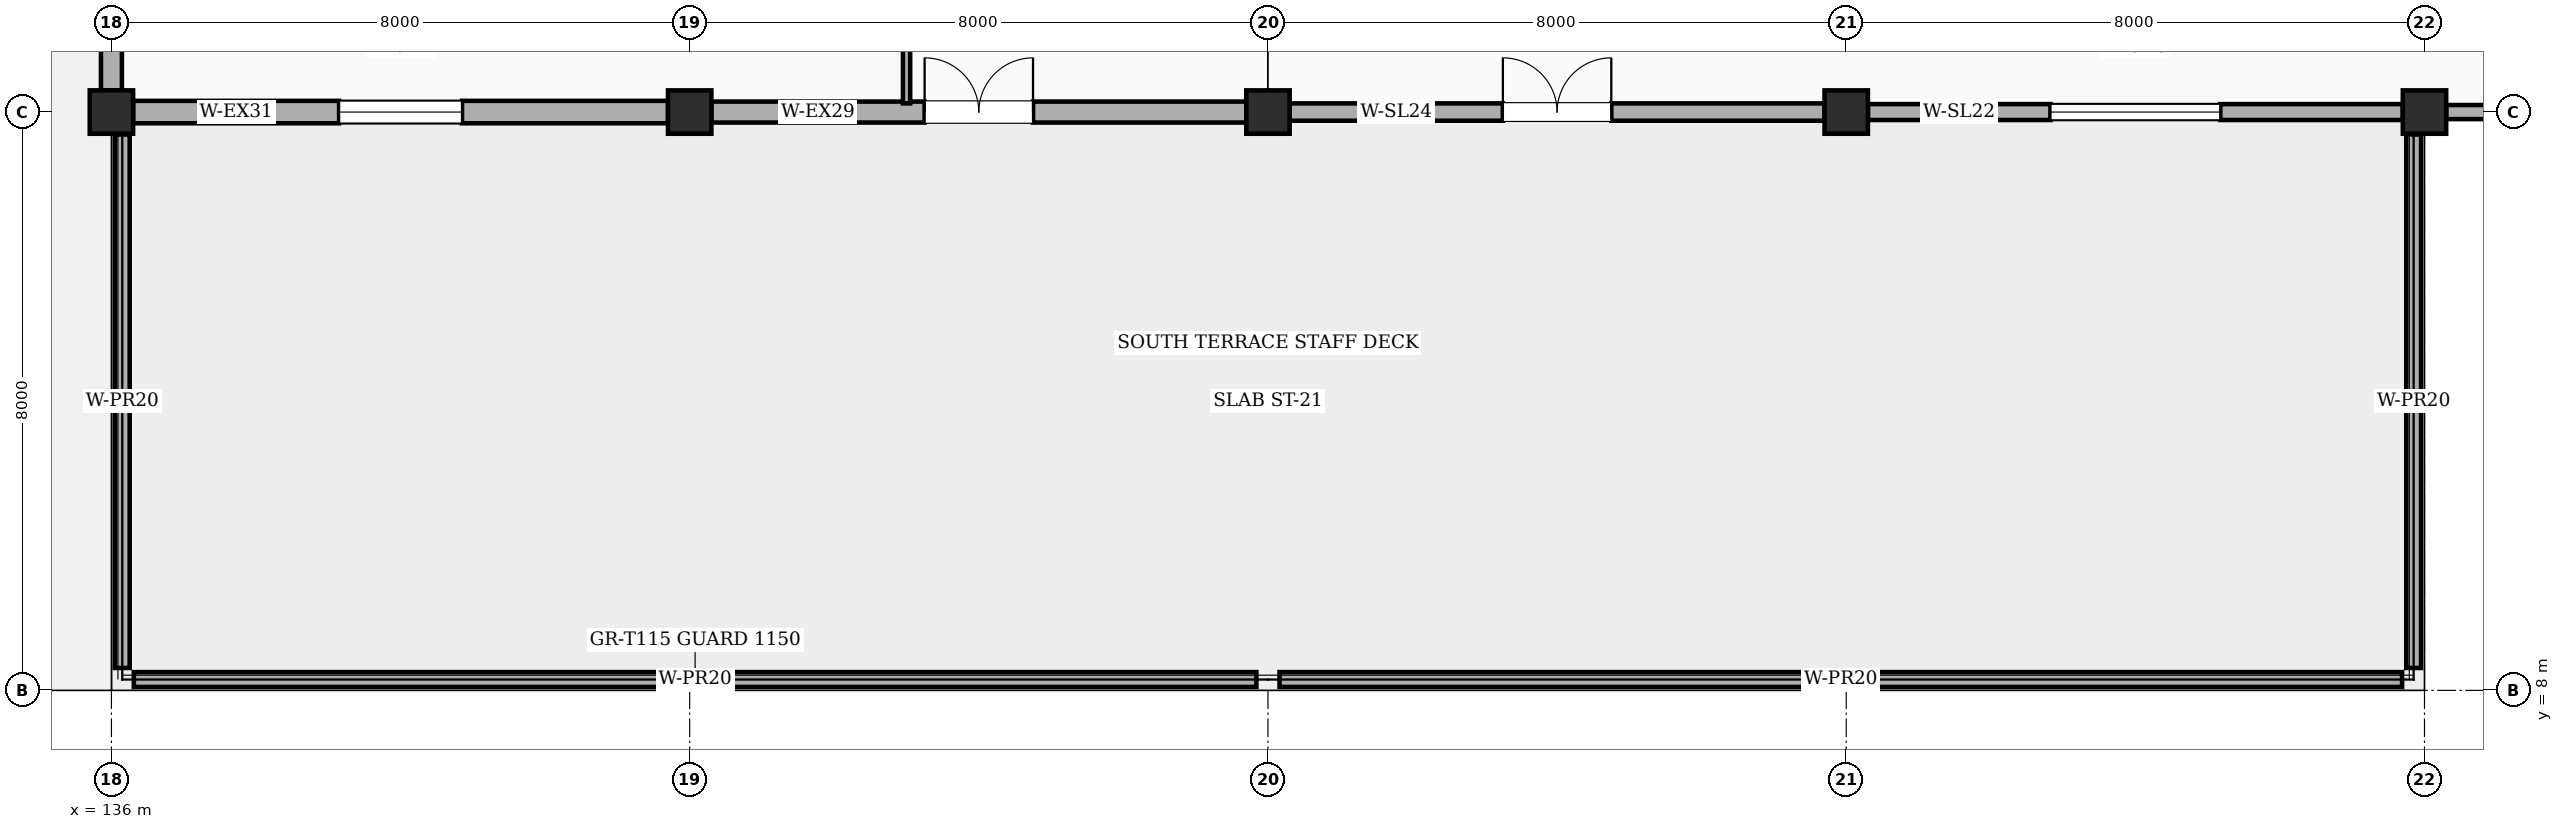
"""IFC4 building model, lengths in metres.
Left out: names, types, materials, properties, quantities, classifications, styles, units other than length and angle.
Written with IfcOpenShell. Run it as: python <this file> out.ifc"""

import sys

from ifc_helpers import new_model, si_unit, direction, frame, frame_2d, origin, origin_2d, place, context, subcontext, project, spatial, rectangle, extrude, element, fill, save


model = new_model("IFC4")
c1 = context("Model", 3, precision=1e-05, world=origin(), true_north=direction((0.0, 1.0)))
c2 = subcontext(c1, "Body", "Model", "MODEL_VIEW")
j1 = project(units=[si_unit("LENGTHUNIT", "METRE"), si_unit("PLANEANGLEUNIT", "RADIAN")], contexts=[c1])
p1 = place(None, origin())
s1 = spatial("IfcSite", under=j1, at=p1, CompositionType="ELEMENT")
p2 = place(p1, origin())
s2 = spatial("IfcBuilding", under=s1, at=p2, CompositionType="ELEMENT")
p3 = place(p2, frame((0.0, 0.0, 19.2)))
s3 = spatial("IfcBuildingStorey", under=s2, at=p3, CompositionType="ELEMENT", Elevation=19.2)
for number, where, z_axis, x_axis in (
    (1, (136.0, 16.0, 0.0), (0.0, 0.0, 1.0), (1.0, 0.0, 0.0)),
    (2, (144.0, 16.0, 0.0), (0.0, 0.0, 1.0), (1.0, 0.0, 0.0)),
    (3, (152.0, 16.0, 0.0), (0.0, 0.0, 1.0), (1.0, 0.0, 0.0)),
    (4, (160.0, 16.0, 0.0), (0.0, 0.0, 1.0), (1.0, 0.0, 0.0)),
    (5, (168.0, 16.0, 0.0), (0.0, 0.0, 1.0), (1.0, 0.0, 0.0)),
):
    element("IfcColumn", number, at=place(p3, frame(where, z_axis=z_axis, x_axis=x_axis)), inside=s3, PredefinedType="COLUMN", context=c2, shape_type="SweptSolid", body=[
        extrude(rectangle(XDim=0.6, YDim=0.6, at=origin_2d()), origin(), (0.0, 0.0, 1.0), 4.2),
    ])
p4 = place(p3, frame((136.3, 16.0, 0.0), z_axis=(0.0, 0.0, 1.0), x_axis=(1.0, 0.0, 0.0)))
e6 = element("IfcWall", 6, at=p4, inside=s3, PredefinedType="STANDARD", context=c2, shape_type="SweptSolid", body=[
    extrude(rectangle(XDim=7.4, YDim=0.31, at=frame_2d((3.7, 0.0))), origin(), (0.0, 0.0, 1.0), 3.442),
])
p5 = place(p4, frame((2.85, 0.0, 0.95)))
e7 = element("IfcOpeningElement", 7, at=p5, cuts=e6, PredefinedType="OPENING", context=c2, shape_type="SweptSolid", body=[
    extrude(rectangle(XDim=1.7, YDim=1.65, at=frame_2d((0.85, 0.825))), frame((0.0, 0.165, 0.0), z_axis=(0.0, -1.0, 0.0), x_axis=(1.0, 0.0, 0.0)), (0.0, 0.0, 1.0), 0.33),
])
p6 = place(p3, frame((144.3, 16.0, 0.0), z_axis=(0.0, 0.0, 1.0), x_axis=(1.0, 0.0, 0.0)))
e8 = element("IfcWall", 8, at=p6, inside=s3, PredefinedType="STANDARD", context=c2, shape_type="SweptSolid", body=[
    extrude(rectangle(XDim=7.4, YDim=0.29, at=frame_2d((3.7, 0.0))), origin(), (0.0, 0.0, 1.0), 3.96),
])
p7 = place(p6, frame((2.95, 0.0, 0.0)))
e9 = element("IfcOpeningElement", 9, at=p7, cuts=e8, PredefinedType="OPENING", context=c2, shape_type="SweptSolid", body=[
    extrude(rectangle(XDim=1.5, YDim=2.25, at=frame_2d((0.75, 1.125))), frame((0.0, 0.155, 0.0), z_axis=(0.0, -1.0, 0.0), x_axis=(1.0, 0.0, 0.0)), (0.0, 0.0, 1.0), 0.31),
])
p8 = place(p3, frame((152.3, 16.0, 0.0), z_axis=(0.0, 0.0, 1.0), x_axis=(1.0, 0.0, 0.0)))
e10 = element("IfcWall", 10, at=p8, inside=s3, PredefinedType="SOLIDWALL", context=c2, shape_type="SweptSolid", body=[
    extrude(rectangle(XDim=7.4, YDim=0.24, at=frame_2d((3.7, 0.0))), origin(), (0.0, 0.0, 1.0), 3.585),
])
p9 = place(p8, frame((2.95, 0.0, 0.0)))
e11 = element("IfcOpeningElement", 11, at=p9, cuts=e10, PredefinedType="OPENING", context=c2, shape_type="SweptSolid", body=[
    extrude(rectangle(XDim=1.5, YDim=2.25, at=frame_2d((0.75, 1.125))), frame((0.0, 0.13, 0.0), z_axis=(0.0, -1.0, 0.0), x_axis=(1.0, 0.0, 0.0)), (0.0, 0.0, 1.0), 0.26),
])
p10 = place(p3, frame((160.3, 16.0, 0.0), z_axis=(0.0, 0.0, 1.0), x_axis=(1.0, 0.0, 0.0)))
e12 = element("IfcWall", 12, at=p10, inside=s3, PredefinedType="SOLIDWALL", context=c2, shape_type="SweptSolid", body=[
    extrude(rectangle(XDim=7.4, YDim=0.22, at=frame_2d((3.7, 0.0))), origin(), (0.0, 0.0, 1.0), 3.585),
])
p11 = place(p10, frame((2.525, 0.0, 0.95)))
e13 = element("IfcOpeningElement", 13, at=p11, cuts=e12, PredefinedType="OPENING", context=c2, shape_type="SweptSolid", body=[
    extrude(rectangle(XDim=2.35, YDim=1.65, at=frame_2d((1.175, 0.825))), frame((0.0, 0.12, 0.0), z_axis=(0.0, -1.0, 0.0), x_axis=(1.0, 0.0, 0.0)), (0.0, 0.0, 1.0), 0.24),
])
p12 = place(p3, frame((168.3, 16.0, 0.0), z_axis=(0.0, 0.0, 1.0), x_axis=(1.0, 0.0, 0.0)))
e14 = element("IfcWall", 14, at=p12, inside=s3, PredefinedType="SOLIDWALL", context=c2, shape_type="SweptSolid", body=[
    extrude(rectangle(XDim=7.4, YDim=0.195, at=frame_2d((3.7, 0.0))), origin(), (0.0, 0.0, 1.0), 3.58),
])
p13 = place(p12, frame((2.85, 0.0, 0.95)))
e15 = element("IfcOpeningElement", 15, at=p13, cuts=e14, PredefinedType="OPENING", context=c2, shape_type="SweptSolid", body=[
    extrude(rectangle(XDim=1.7, YDim=1.65, at=frame_2d((0.85, 0.825))), frame((0.0, 0.107, 0.0), z_axis=(0.0, -1.0, 0.0), x_axis=(1.0, 0.0, 0.0)), (0.0, 0.0, 1.0), 0.215),
])
p14 = place(p3, frame((136.0, 23.7, 0.0), z_axis=(0.0, 0.0, 1.0), x_axis=(0.0, -1.0, 0.0)))
e16 = element("IfcWall", 16, at=p14, inside=s3, PredefinedType="STANDARD", context=c2, shape_type="SweptSolid", body=[
    extrude(rectangle(XDim=7.4, YDim=0.29, at=frame_2d((3.7, 0.0))), origin(), (0.0, 0.0, 1.0), 3.58),
])
p15 = place(p14, frame((2.525, 0.0, 0.95)))
e17 = element("IfcOpeningElement", 17, at=p15, cuts=e16, PredefinedType="OPENING", context=c2, shape_type="SweptSolid", body=[
    extrude(rectangle(XDim=2.35, YDim=1.65, at=frame_2d((1.175, 0.825))), frame((0.0, 0.155, 0.0), z_axis=(0.0, -1.0, 0.0), x_axis=(1.0, 0.0, 0.0)), (0.0, 0.0, 1.0), 0.31),
])
for number, where, z_axis, x_axis in (
    (18, (136.31, 8.15, 0.0), (0.0, 0.0, 1.0), (1.0, 0.0, 0.0)),
    (19, (152.16, 8.15, 0.0), (0.0, 0.0, 1.0), (1.0, 0.0, 0.0)),
):
    element("IfcWall", number, at=place(p3, frame(where, z_axis=z_axis, x_axis=x_axis)), inside=s3, PredefinedType="PARAPET", context=c2, shape_type="SweptSolid", body=[
        extrude(rectangle(XDim=15.53, YDim=0.205, at=frame_2d((7.765, 0.0))), origin(), (0.0, 0.0, 1.0), 0.42),
    ])
for number, where, z_axis, x_axis in (
    (20, (136.15, 8.31, 0.0), (0.0, 0.0, 1.0), (0.0, 1.0, 0.0)),
    (21, (167.85, 8.31, 0.0), (0.0, 0.0, 1.0), (0.0, 1.0, 0.0)),
):
    element("IfcWall", number, at=place(p3, frame(where, z_axis=z_axis, x_axis=x_axis)), inside=s3, PredefinedType="PARAPET", context=c2, shape_type="SweptSolid", body=[
        extrude(rectangle(XDim=7.38, YDim=0.205, at=frame_2d((3.69, 0.0))), origin(), (0.0, 0.0, 1.0), 0.42),
    ])
p16 = place(p3, frame((147.0, 16.12, 0.0), z_axis=(0.0, 0.0, 1.0), x_axis=(0.0, 1.0, 0.0)))
e22 = element("IfcWall", 22, at=p16, inside=s3, PredefinedType="PARTITIONING", context=c2, shape_type="SweptSolid", body=[
    extrude(rectangle(XDim=23.86, YDim=0.1, at=frame_2d((11.93, 0.0))), origin(), (0.0, 0.0, 1.0), 3.96),
])
p17 = place(p16, frame((11.305, 0.0, 0.0)))
e23 = element("IfcOpeningElement", 23, at=p17, cuts=e22, PredefinedType="OPENING", context=c2, shape_type="SweptSolid", body=[
    extrude(rectangle(XDim=1.25, YDim=2.15, at=frame_2d((0.625, 1.075))), frame((0.0, 0.06, 0.0), z_axis=(0.0, -1.0, 0.0), x_axis=(1.0, 0.0, 0.0)), (0.0, 0.0, 1.0), 0.12),
])
p18 = place(p5, origin())
e24 = element("IfcWindow", 24, at=p18, inside=s3, PartitioningType="SINGLE_PANEL", PredefinedType="WINDOW", context=c2, shape_type="SweptSolid", body=[
    extrude(rectangle(XDim=1.7, YDim=1.65, at=frame_2d((0.85, 0.825))), frame((0.0, 0.03, 0.0), z_axis=(0.0, -1.0, 0.0), x_axis=(1.0, 0.0, 0.0)), (0.0, 0.0, 1.0), 0.06),
])
fill(e7, e24)
p19 = place(p7, frame((1.5, 0.0, 0.0), z_axis=(0.0, 0.0, 1.0), x_axis=(-1.0, 0.0, 0.0)))
e25 = element("IfcDoor", 25, at=p19, inside=s3, OperationType="DOUBLE_DOOR_SINGLE_SWING", PredefinedType="DOOR", context=c2, shape_type="SweptSolid", body=[
    extrude(rectangle(XDim=1.5, YDim=2.25, at=frame_2d((-0.75, 1.125))), frame((0.0, -0.025, 0.0), z_axis=(0.0, 1.0, 0.0), x_axis=(-1.0, 0.0, 0.0)), (0.0, 0.0, 1.0), 0.05),
])
fill(e9, e25)
p20 = place(p9, frame((1.5, 0.0, 0.0), z_axis=(0.0, 0.0, 1.0), x_axis=(-1.0, 0.0, 0.0)))
e26 = element("IfcDoor", 26, at=p20, inside=s3, OperationType="DOUBLE_DOOR_SINGLE_SWING", PredefinedType="DOOR", context=c2, shape_type="SweptSolid", body=[
    extrude(rectangle(XDim=1.5, YDim=2.25, at=frame_2d((-0.75, 1.125))), frame((0.0, -0.025, 0.0), z_axis=(0.0, 1.0, 0.0), x_axis=(-1.0, 0.0, 0.0)), (0.0, 0.0, 1.0), 0.05),
])
fill(e11, e26)
p21 = place(p11, origin())
e27 = element("IfcWindow", 27, at=p21, inside=s3, PartitioningType="SINGLE_PANEL", PredefinedType="WINDOW", context=c2, shape_type="SweptSolid", body=[
    extrude(rectangle(XDim=2.35, YDim=1.65, at=frame_2d((1.175, 0.825))), frame((0.0, 0.03, 0.0), z_axis=(0.0, -1.0, 0.0), x_axis=(1.0, 0.0, 0.0)), (0.0, 0.0, 1.0), 0.06),
])
fill(e13, e27)
save(model, sys.argv[1])
